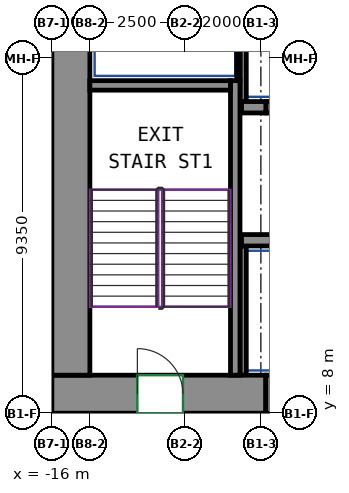
"""IFC4 building model, lengths in metres.
Left out: names, types, materials, properties, quantities, classifications, styles, units other than length and angle.
Written with IfcOpenShell. Run it as: python <this file> out.ifc"""

import sys

from ifc_helpers import new_model, si_unit, direction, frame, frame_2d, origin, place, context, subcontext, project, spatial, rectangle, extrude, source, transform, mapped, element, fill, save


model = new_model("IFC4")
c1 = context("Model", 3, precision=1e-05, world=origin(), true_north=direction((0.0, 1.0)))
c2 = subcontext(c1, "Body", "Model", "MODEL_VIEW")
j1 = project(units=[si_unit("LENGTHUNIT", "METRE"), si_unit("PLANEANGLEUNIT", "RADIAN")], contexts=[c1])
p1 = place(None, origin())
s1 = spatial("IfcSite", under=j1, at=p1, CompositionType="ELEMENT")
p2 = place(p1, origin())
s2 = spatial("IfcBuilding", under=s1, at=p2, CompositionType="ELEMENT")
p3 = place(p2, frame((0.0, 0.0, 47.0)))
s3 = spatial("IfcBuildingStorey", under=s2, at=p3, CompositionType="ELEMENT", Elevation=47.0)
m1 = source(origin(), c2, "Body", "SweptSolid", [
    extrude(rectangle(XDim=5.63, YDim=1.0, at=frame_2d((2.815, 0.0))), origin(), (0.0, 0.0, 1.0), 3.72),
])
p4 = place(p3, frame((-16.0, 8.5, 0.0), z_axis=(0.0, 0.0, 1.0), x_axis=(1.0, 0.0, 0.0)))
e1 = element("IfcWall", 1, at=p4, inside=s3, PredefinedType="SHEAR", context=c2, shape_type="MappedRepresentation", body=[
    mapped(m1, transform((0.0, 0.0, 0.0))),
])
p5 = place(p4, frame((2.25, 0.0, 0.0)))
e2 = element("IfcOpeningElement", 2, at=p5, cuts=e1, PredefinedType="OPENING", context=c2, shape_type="SweptSolid", body=[
    extrude(rectangle(XDim=1.2, YDim=2.1, at=frame_2d((0.6, 1.05))), frame((0.0, 0.51, 0.0), z_axis=(0.0, -1.0, 0.0), x_axis=(1.0, 0.0, 0.0)), (0.0, 0.0, 1.0), 1.02),
])
m2 = source(origin(), c2, "Body", "SweptSolid", [
    extrude(rectangle(XDim=12.0, YDim=1.0, at=frame_2d((6.0, 0.0))), origin(), (0.0, 0.0, 1.0), 3.72),
])
p6 = place(p3, frame((-15.5, 9.0, 0.0), z_axis=(0.0, 0.0, 1.0), x_axis=(0.0, 1.0, 0.0)))
e3 = element("IfcWall", 3, at=p6, inside=s3, PredefinedType="SHEAR", context=c2, shape_type="MappedRepresentation", body=[
    mapped(m2, transform((0.0, 0.0, 0.0))),
])
m3 = source(origin(), c2, "Body", "SweptSolid", [
    extrude(rectangle(XDim=7.75, YDim=0.25, at=frame_2d((3.875, 0.0))), origin(), (0.0, 0.0, 1.0), 3.72),
])
p7 = place(p3, frame((-11.175, 9.0, 0.0), z_axis=(0.0, 0.0, 1.0), x_axis=(0.0, 1.0, 0.0)))
e4 = element("IfcWall", 4, at=p7, inside=s3, PredefinedType="SHEAR", context=c2, shape_type="MappedRepresentation", body=[
    mapped(m3, transform((0.0, 0.0, 0.0))),
])
m4 = source(origin(), c2, "Body", "SweptSolid", [
    extrude(rectangle(XDim=3.7, YDim=0.25, at=frame_2d((1.85, 0.0))), origin(), (0.0, 0.0, 1.0), 3.72),
])
p8 = place(p3, frame((-15.0, 16.625, 0.0), z_axis=(0.0, 0.0, 1.0), x_axis=(1.0, 0.0, 0.0)))
e5 = element("IfcWall", 5, at=p8, inside=s3, PredefinedType="SHEAR", context=c2, shape_type="MappedRepresentation", body=[
    mapped(m4, transform((0.0, 0.0, 0.0))),
])
m5 = source(origin(), c2, "Body", "SweptSolid", [
    extrude(rectangle(XDim=6.0, YDim=0.3, at=frame_2d((3.0, 0.0))), origin(), (0.0, 0.0, 1.0), 3.72),
])
p9 = place(p3, frame((-11.01, 12.55, 0.0), z_axis=(0.0, 0.0, 1.0), x_axis=(1.0, 0.0, 0.0)))
e6 = element("IfcWall", 6, at=p9, inside=s3, PredefinedType="SHEAR", context=c2, shape_type="MappedRepresentation", body=[
    mapped(m5, transform((0.0, 0.0, 0.0))),
])
m6 = source(origin(), c2, "Body", "SweptSolid", [
    extrude(rectangle(XDim=0.64, YDim=0.3, at=frame_2d((0.32, 0.0))), origin(), (0.0, 0.0, 1.0), 3.72),
])
p10 = place(p3, frame((-11.01, 16.05, 0.0), z_axis=(0.0, 0.0, 1.0), x_axis=(1.0, 0.0, 0.0)))
e7 = element("IfcWall", 7, at=p10, inside=s3, PredefinedType="SHEAR", context=c2, shape_type="MappedRepresentation", body=[
    mapped(m6, transform((0.0, 0.0, 0.0))),
])
m7 = source(origin(), c2, "Body", "SweptSolid", [
    extrude(rectangle(XDim=1.4, YDim=0.3, at=frame_2d((0.7, 0.0))), origin(), (0.0, 0.0, 1.0), 3.72),
])
p11 = place(p3, frame((-10.37, 16.05, 0.0), z_axis=(0.0, 0.0, 1.0), x_axis=(1.0, 0.0, 0.0)))
e8 = element("IfcWall", 8, at=p11, inside=s3, PredefinedType="PARTITIONING", context=c2, shape_type="MappedRepresentation", body=[
    mapped(m7, transform((0.0, 0.0, 0.0))),
])
p12 = place(p11, frame((0.15, 0.0, 0.0)))
e9 = element("IfcOpeningElement", 9, at=p12, cuts=e8, PredefinedType="OPENING", context=c2, shape_type="SweptSolid", body=[
    extrude(rectangle(XDim=1.1, YDim=2.1, at=frame_2d((0.55, 1.05))), frame((0.0, 0.16, 0.0), z_axis=(0.0, -1.0, 0.0), x_axis=(1.0, 0.0, 0.0)), (0.0, 0.0, 1.0), 0.32),
])
m8 = source(origin(), c2, "Body", "SweptSolid", [
    extrude(rectangle(XDim=3.275, YDim=0.165, at=frame_2d((1.638, 0.0))), origin(), (0.0, 0.0, 1.0), 3.72),
])
p13 = place(p3, frame((-10.968, 16.2, 0.0), z_axis=(0.0, 0.0, 1.0), x_axis=(0.0, 1.0, 0.0)))
e10 = element("IfcWall", 10, at=p13, inside=s3, PredefinedType="PARTITIONING", context=c2, shape_type="MappedRepresentation", body=[
    mapped(m8, transform((0.0, 0.0, 0.0))),
])
m9 = source(origin(), c2, "Body", "SweptSolid", [
    extrude(rectangle(XDim=2.725, YDim=0.085, at=frame_2d((1.363, 0.0))), origin(), (0.0, 0.0, 1.0), 3.72),
])
p14 = place(p3, frame((-11.093, 16.75, 0.0), z_axis=(0.0, 0.0, 1.0), x_axis=(0.0, 1.0, 0.0)))
e11 = element("IfcWall", 11, at=p14, inside=s3, PredefinedType="PARTITIONING", context=c2, shape_type="MappedRepresentation", body=[
    mapped(m9, transform((0.0, 0.0, 0.0))),
])
m10 = source(origin(), c2, "Body", "SweptSolid", [
    extrude(rectangle(XDim=3.4, YDim=0.165, at=frame_2d((1.7, 0.0))), origin(), (0.0, 0.0, 1.0), 3.72),
])
p15 = place(p3, frame((-10.968, 9.0, 0.0), z_axis=(0.0, 0.0, 1.0), x_axis=(0.0, 1.0, 0.0)))
e12 = element("IfcWall", 12, at=p15, inside=s3, PredefinedType="PARTITIONING", context=c2, shape_type="MappedRepresentation", body=[
    mapped(m10, transform((0.0, 0.0, 0.0))),
])
m11 = source(origin(), c2, "Body", "SweptSolid", [
    extrude(rectangle(XDim=1.4, YDim=1.0, at=frame_2d((0.7, 0.0))), origin(), (0.0, 0.0, 1.0), 2.7),
])
p16 = place(p3, frame((-10.37, 8.5, 0.0), z_axis=(0.0, 0.0, 1.0), x_axis=(1.0, 0.0, 0.0)))
e13 = element("IfcWall", 13, at=p16, inside=s3, PredefinedType="PARTITIONING", context=c2, shape_type="MappedRepresentation", body=[
    mapped(m11, transform((0.0, 0.0, 0.0))),
])
p17 = place(p16, frame((0.25, 0.0, 0.0)))
e14 = element("IfcOpeningElement", 14, at=p17, cuts=e13, PredefinedType="OPENING", context=c2, shape_type="SweptSolid", body=[
    extrude(rectangle(XDim=0.9, YDim=2.1, at=frame_2d((0.45, 1.05))), frame((0.0, 0.51, 0.0), z_axis=(0.0, -1.0, 0.0), x_axis=(1.0, 0.0, 0.0)), (0.0, 0.0, 1.0), 1.02),
])
p18 = place(p3, frame((-14.05, 8.0, 0.0), z_axis=(0.0, 0.0, 1.0), x_axis=(0.0, -1.0, 0.0)))
e15 = element("IfcWall", 15, at=p18, inside=s3, PredefinedType="PARTITIONING", context=c2, shape_type="SweptSolid", body=[
    extrude(rectangle(XDim=4.51, YDim=0.15, at=frame_2d((2.255, 0.0))), origin(), (0.0, 0.0, 1.0), 3.72),
])
p19 = place(p5, origin())
e16 = element("IfcDoor", 16, at=p19, inside=s3, OperationType="DOUBLE_DOOR_SINGLE_SWING", PredefinedType="DOOR", context=c2, shape_type="SweptSolid", body=[
    extrude(rectangle(XDim=1.2, YDim=2.1, at=frame_2d((0.6, 1.05))), frame((0.0, 0.405, 0.0), z_axis=(0.0, -1.0, 0.0), x_axis=(1.0, 0.0, 0.0)), (0.0, 0.0, 1.0), 0.05),
])
fill(e2, e16)
save(model, sys.argv[1])
